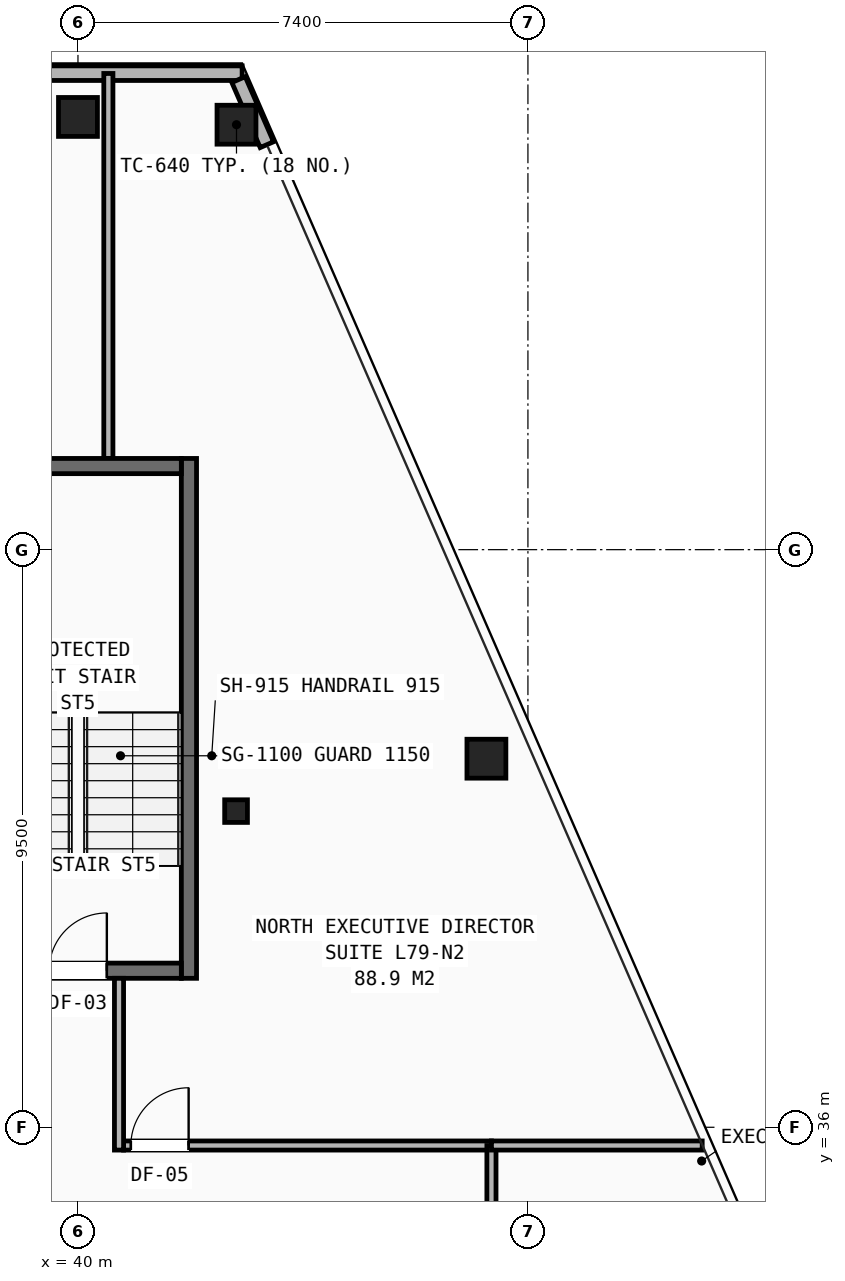
"""IFC4 building model, lengths in metres.
Left out: names, types, materials, properties, quantities, classifications, styles, units other than length and angle.
Written with IfcOpenShell. Run it as: python <this file> out.ifc"""

import sys

from ifc_helpers import new_model, si_unit, direction, frame, frame_2d, origin, origin_2d, place, context, subcontext, project, spatial, rectangle, hollow_rectangle, i_section, extrude, element, fill, save


model = new_model("IFC4")
c1 = context("Model", 3, precision=1e-05, world=origin(), true_north=direction((0.0, 1.0)))
c2 = subcontext(c1, "Body", "Model", "MODEL_VIEW")
j1 = project(units=[si_unit("LENGTHUNIT", "METRE"), si_unit("PLANEANGLEUNIT", "RADIAN")], contexts=[c1])
p1 = place(None, origin())
s1 = spatial("IfcSite", under=j1, at=p1, CompositionType="ELEMENT")
p2 = place(p1, origin())
s2 = spatial("IfcBuilding", under=s1, at=p2, CompositionType="ELEMENT")
p3 = place(p2, frame((0.0, 0.0, 279.5)))
s3 = spatial("IfcBuildingStorey", under=s2, at=p3, CompositionType="ELEMENT", Elevation=279.5)
p4 = place(p3, frame((42.6, 41.2, 0.0), z_axis=(0.0, 0.0, 1.0), x_axis=(1.0, 0.0, 0.0)))
e1 = element("IfcColumn", 1, at=p4, inside=s3, PredefinedType="COLUMN", context=c2, shape_type="SweptSolid", body=[
    extrude(i_section(OverallWidth=0.374, OverallDepth=0.372, WebThickness=0.016, FlangeThickness=0.026, at=origin_2d()), origin(), (0.0, 0.0, 1.0), 3.5),
])
for number, where, z_axis, x_axis in (
    (2, (42.607, 52.489, 0.0), (0.0, 0.0, 1.0), (1.0, 0.0, 0.0)),
    (3, (40.0, 52.617, 0.0), (0.0, 0.0, 1.0), (1.0, 0.0, 0.0)),
    (4, (46.717, 42.062, 0.0), (0.0, 0.0, 1.0), (1.0, 0.0, 0.0)),
):
    element("IfcColumn", number, at=place(p3, frame(where, z_axis=z_axis, x_axis=x_axis)), inside=s3, PredefinedType="COLUMN", context=c2, shape_type="SweptSolid", body=[
        extrude(hollow_rectangle(XDim=0.64, YDim=0.64, WallThickness=0.045, at=origin_2d()), origin(), (0.0, 0.0, 1.0), 3.5),
    ])
p5 = place(p3, frame((37.3, 53.337, 0.0), z_axis=(0.0, 0.0, 1.0), x_axis=(1.0, 0.0, 0.0)))
e5 = element("IfcWall", 5, at=p5, inside=s3, PredefinedType="SHEAR", context=c2, shape_type="SweptSolid", body=[
    extrude(rectangle(XDim=5.4, YDim=0.24, at=frame_2d((2.7, 0.0))), origin(), (0.0, 0.0, 1.0), 2.623),
])
p6 = place(p3, frame((43.107, 52.161, 0.0), z_axis=(0.0, 0.0, 1.0), x_axis=(-0.398986072719, 0.916956985783, 0.0)))
e6 = element("IfcWall", 6, at=p6, inside=s3, PredefinedType="SHEAR", context=c2, shape_type="SweptSolid", body=[
    extrude(rectangle(XDim=1.167, YDim=0.24, at=frame_2d((0.584, 0.0))), origin(), (0.0, 0.0, 1.0), 2.623),
])
p7 = place(p3, frame((40.75, 35.7, 0.0), z_axis=(0.0, 0.0, 1.0), x_axis=(1.0, 0.0, 0.0)))
e7 = element("IfcWall", 7, at=p7, inside=s3, PredefinedType="PARTITIONING", context=c2, shape_type="SweptSolid", body=[
    extrude(rectangle(XDim=6.05, YDim=0.15, at=frame_2d((3.025, 0.0))), origin(), (0.0, 0.0, 1.0), 3.25),
])
p8 = place(p7, frame((0.12, 0.0, 0.0)))
e8 = element("IfcOpeningElement", 8, at=p8, cuts=e7, PredefinedType="OPENING", context=c2, shape_type="SweptSolid", body=[
    extrude(rectangle(XDim=0.95, YDim=2.1, at=frame_2d((0.475, 1.05))), frame((0.0, 0.085, 0.0), z_axis=(0.0, -1.0, 0.0), x_axis=(1.0, 0.0, 0.0)), (0.0, 0.0, 1.0), 0.17),
])
p9 = place(p3, frame((46.8, 31.2, 0.0), z_axis=(0.0, 0.0, 1.0), x_axis=(0.0, 1.0, 0.0)))
e9 = element("IfcWall", 9, at=p9, inside=s3, PredefinedType="PARTITIONING", context=c2, shape_type="SweptSolid", body=[
    extrude(rectangle(XDim=4.5, YDim=0.15, at=frame_2d((2.25, 0.0))), origin(), (0.0, 0.0, 1.0), 2.705),
])
p10 = place(p3, frame((46.8, 35.7, 0.0), z_axis=(0.0, 0.0, 1.0), x_axis=(1.0, 0.0, 0.0)))
e10 = element("IfcWall", 10, at=p10, inside=s3, PredefinedType="PARTITIONING", context=c2, shape_type="SweptSolid", body=[
    extrude(rectangle(XDim=3.466, YDim=0.15, at=frame_2d((1.733, 0.0))), origin(), (0.0, 0.0, 1.0), 2.628),
])
p11 = place(p3, frame((40.5, 47.0, 0.0), z_axis=(0.0, 0.0, 1.0), x_axis=(0.0, 1.0, 0.0)))
e11 = element("IfcWall", 11, at=p11, inside=s3, PredefinedType="PARTITIONING", context=c2, shape_type="SweptSolid", body=[
    extrude(rectangle(XDim=6.332, YDim=0.15, at=frame_2d((3.166, 0.0))), origin(), (0.0, 0.0, 1.0), 2.628),
])
p12 = place(p3, frame((41.825, 38.45, 0.0), z_axis=(0.0, 0.0, 1.0), x_axis=(0.0, 1.0, 0.0)))
e12 = element("IfcWall", 12, at=p12, inside=s3, PredefinedType="SHEAR", context=c2, shape_type="SweptSolid", body=[
    extrude(rectangle(XDim=8.55, YDim=0.25, at=frame_2d((4.275, 0.0))), origin(), (0.0, 0.0, 1.0), 3.25),
])
p13 = place(p3, frame((38.3, 38.575, 0.0), z_axis=(0.0, 0.0, 1.0), x_axis=(1.0, 0.0, 0.0)))
e13 = element("IfcWall", 13, at=p13, inside=s3, PredefinedType="SHEAR", context=c2, shape_type="SweptSolid", body=[
    extrude(rectangle(XDim=3.4, YDim=0.25, at=frame_2d((1.7, 0.0))), origin(), (0.0, 0.0, 1.0), 3.25),
])
p14 = place(p13, frame((1.225, 0.0, 0.0)))
e14 = element("IfcOpeningElement", 14, at=p14, cuts=e13, PredefinedType="OPENING", context=c2, shape_type="SweptSolid", body=[
    extrude(rectangle(XDim=0.95, YDim=2.1, at=frame_2d((0.475, 1.05))), frame((0.0, 0.135, 0.0), z_axis=(0.0, -1.0, 0.0), x_axis=(1.0, 0.0, 0.0)), (0.0, 0.0, 1.0), 0.27),
])
p15 = place(p3, frame((38.3, 46.875, 0.0), z_axis=(0.0, 0.0, 1.0), x_axis=(1.0, 0.0, 0.0)))
e15 = element("IfcWall", 15, at=p15, inside=s3, PredefinedType="SHEAR", context=c2, shape_type="SweptSolid", body=[
    extrude(rectangle(XDim=3.4, YDim=0.25, at=frame_2d((1.7, 0.0))), origin(), (0.0, 0.0, 1.0), 3.25),
])
p16 = place(p3, frame((40.675, 35.625, 0.0), z_axis=(0.0, 0.0, 1.0), x_axis=(0.0, 1.0, 0.0)))
e16 = element("IfcWall", 16, at=p16, inside=s3, PredefinedType="PARTITIONING", context=c2, shape_type="SweptSolid", body=[
    extrude(rectangle(XDim=2.825, YDim=0.15, at=frame_2d((1.413, 0.0))), origin(), (0.0, 0.0, 1.0), 3.25),
])
p17 = place(p8, origin())
e17 = element("IfcDoor", 17, at=p17, inside=s3, OperationType="SINGLE_SWING_RIGHT", PredefinedType="DOOR", context=c2, shape_type="SweptSolid", body=[
    extrude(rectangle(XDim=0.95, YDim=2.1, at=frame_2d((0.475, 1.05))), frame((0.0, 0.025, 0.0), z_axis=(0.0, -1.0, 0.0), x_axis=(1.0, 0.0, 0.0)), (0.0, 0.0, 1.0), 0.05),
])
fill(e8, e17)
p18 = place(p14, origin())
e18 = element("IfcDoor", 18, at=p18, inside=s3, OperationType="SINGLE_SWING_RIGHT", PredefinedType="DOOR", context=c2, shape_type="SweptSolid", body=[
    extrude(rectangle(XDim=0.95, YDim=2.1, at=frame_2d((0.475, 1.05))), frame((0.0, 0.025, 0.0), z_axis=(0.0, -1.0, 0.0), x_axis=(1.0, 0.0, 0.0)), (0.0, 0.0, 1.0), 0.05),
])
fill(e14, e18)
save(model, sys.argv[1])
